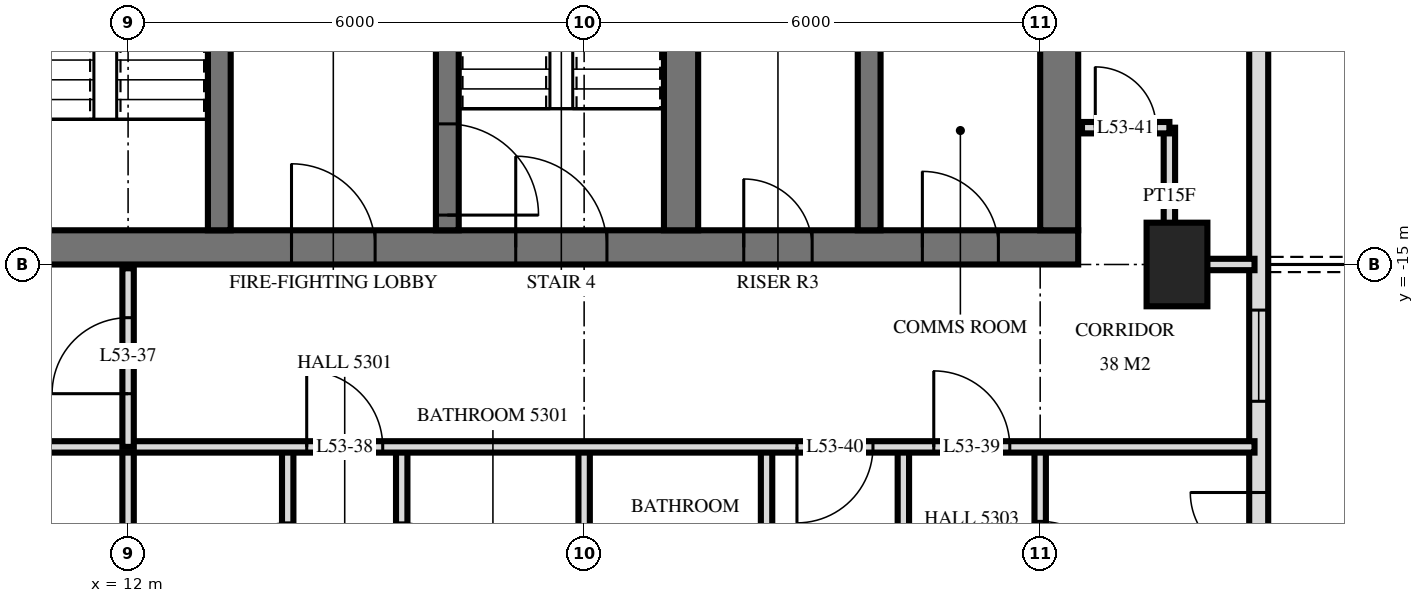
"""IFC4 building model, lengths in metres.
Left out: names, types, materials, properties, quantities, classifications, styles, units other than length and angle.
Written with IfcOpenShell. Run it as: python <this file> out.ifc"""

import sys

from ifc_helpers import new_model, si_unit, direction, frame, frame_2d, origin, origin_2d, place, context, subcontext, project, spatial, rectangle, extrude, element, fill, save


model = new_model("IFC4")
c1 = context("Model", 3, precision=1e-05, world=origin(), true_north=direction((0.0, 1.0)))
c2 = subcontext(c1, "Body", "Model", "MODEL_VIEW")
j1 = project(units=[si_unit("LENGTHUNIT", "METRE"), si_unit("PLANEANGLEUNIT", "RADIAN")], contexts=[c1])
p1 = place(None, origin())
s1 = spatial("IfcSite", under=j1, at=p1, CompositionType="ELEMENT")
p2 = place(p1, origin())
s2 = spatial("IfcBuilding", under=s1, at=p2, CompositionType="ELEMENT")
p3 = place(p2, frame((0.0, 0.0, 204.6)))
s3 = spatial("IfcBuildingStorey", under=s2, at=p3, CompositionType="ELEMENT", Elevation=204.6)
p4 = place(p3, frame((25.8, -15.0, 0.0), z_axis=(0.0, 0.0, 1.0), x_axis=(0.0, 1.0, 0.0)))
e1 = element("IfcColumn", 1, at=p4, inside=s3, PredefinedType="COLUMN", context=c2, shape_type="SweptSolid", body=[
    extrude(rectangle(XDim=1.1, YDim=0.8, at=origin_2d()), origin(), (0.0, 0.0, 1.0), 3.5),
])
p5 = place(p3, frame((10.0, -14.775, 0.0), z_axis=(0.0, 0.0, 1.0), x_axis=(1.0, 0.0, 0.0)))
e2 = element("IfcWall", 2, at=p5, inside=s3, PredefinedType="SHEAR", context=c2, shape_type="SweptSolid", body=[
    extrude(rectangle(XDim=14.5, YDim=0.45, at=frame_2d((7.25, 0.0))), origin(), (0.0, 0.0, 1.0), 3.5),
])
p6 = place(p5, frame((7.1, 0.0, 0.0)))
e3 = element("IfcOpeningElement", 3, at=p6, cuts=e2, PredefinedType="OPENING", context=c2, shape_type="SweptSolid", body=[
    extrude(rectangle(XDim=1.2, YDim=2.1, at=frame_2d((0.6, 1.05))), frame((0.0, 0.235, 0.0), z_axis=(0.0, -1.0, 0.0), x_axis=(1.0, 0.0, 0.0)), (0.0, 0.0, 1.0), 0.47),
])
p7 = place(p5, frame((4.15, 0.0, 0.0)))
e4 = element("IfcOpeningElement", 4, at=p7, cuts=e2, PredefinedType="OPENING", context=c2, shape_type="SweptSolid", body=[
    extrude(rectangle(XDim=1.1, YDim=2.1, at=frame_2d((0.55, 1.05))), frame((0.0, 0.235, 0.0), z_axis=(0.0, -1.0, 0.0), x_axis=(1.0, 0.0, 0.0)), (0.0, 0.0, 1.0), 0.47),
])
p8 = place(p5, frame((10.1, 0.0, 0.0)))
e5 = element("IfcOpeningElement", 5, at=p8, cuts=e2, PredefinedType="OPENING", context=c2, shape_type="SweptSolid", body=[
    extrude(rectangle(XDim=0.9, YDim=2.1, at=frame_2d((0.45, 1.05))), frame((0.0, 0.235, 0.0), z_axis=(0.0, -1.0, 0.0), x_axis=(1.0, 0.0, 0.0)), (0.0, 0.0, 1.0), 0.47),
])
p9 = place(p5, frame((12.45, 0.0, 0.0)))
e6 = element("IfcOpeningElement", 6, at=p9, cuts=e2, PredefinedType="OPENING", context=c2, shape_type="SweptSolid", body=[
    extrude(rectangle(XDim=1.0, YDim=2.1, at=frame_2d((0.5, 1.05))), frame((0.0, 0.235, 0.0), z_axis=(0.0, -1.0, 0.0), x_axis=(1.0, 0.0, 0.0)), (0.0, 0.0, 1.0), 0.47),
])
p10 = place(p3, frame((24.25, -14.55, 0.0), z_axis=(0.0, 0.0, 1.0), x_axis=(0.0, 1.0, 0.0)))
e7 = element("IfcWall", 7, at=p10, inside=s3, PredefinedType="SHEAR", context=c2, shape_type="SweptSolid", body=[
    extrude(rectangle(XDim=14.1, YDim=0.5, at=frame_2d((7.05, 0.0))), origin(), (0.0, 0.0, 1.0), 3.5),
])
p11 = place(p3, frame((13.2, -14.55, 0.0), z_axis=(0.0, 0.0, 1.0), x_axis=(0.0, 1.0, 0.0)))
e8 = element("IfcWall", 8, at=p11, inside=s3, PredefinedType="SHEAR", context=c2, shape_type="SweptSolid", body=[
    extrude(rectangle(XDim=5.4, YDim=0.3, at=frame_2d((2.7, 0.0))), origin(), (0.0, 0.0, 1.0), 3.5),
])
p12 = place(p11, frame((4.0, 0.0, 0.0)))
e9 = element("IfcOpeningElement", 9, at=p12, cuts=e8, PredefinedType="OPENING", context=c2, shape_type="SweptSolid", body=[
    extrude(rectangle(XDim=1.2, YDim=2.1, at=frame_2d((0.6, 1.05))), frame((0.0, 0.16, 0.0), z_axis=(0.0, -1.0, 0.0), x_axis=(1.0, 0.0, 0.0)), (0.0, 0.0, 1.0), 0.32),
])
p13 = place(p3, frame((16.2, -14.55, 0.0), z_axis=(0.0, 0.0, 1.0), x_axis=(0.0, 1.0, 0.0)))
e10 = element("IfcWall", 10, at=p13, inside=s3, PredefinedType="SHEAR", context=c2, shape_type="SweptSolid", body=[
    extrude(rectangle(XDim=5.4, YDim=0.3, at=frame_2d((2.7, 0.0))), origin(), (0.0, 0.0, 1.0), 3.5),
])
p14 = place(p13, frame((0.2, 0.0, 0.0)))
e11 = element("IfcOpeningElement", 11, at=p14, cuts=e10, PredefinedType="OPENING", context=c2, shape_type="SweptSolid", body=[
    extrude(rectangle(XDim=1.2, YDim=2.1, at=frame_2d((0.6, 1.05))), frame((0.0, 0.16, 0.0), z_axis=(0.0, -1.0, 0.0), x_axis=(1.0, 0.0, 0.0)), (0.0, 0.0, 1.0), 0.32),
])
p15 = place(p3, frame((19.275, -14.55, 0.0), z_axis=(0.0, 0.0, 1.0), x_axis=(0.0, 1.0, 0.0)))
e12 = element("IfcWall", 12, at=p15, inside=s3, PredefinedType="SHEAR", context=c2, shape_type="SweptSolid", body=[
    extrude(rectangle(XDim=5.4, YDim=0.45, at=frame_2d((2.7, 0.0))), origin(), (0.0, 0.0, 1.0), 3.5),
])
p16 = place(p3, frame((21.75, -14.55, 0.0), z_axis=(0.0, 0.0, 1.0), x_axis=(0.0, 1.0, 0.0)))
e13 = element("IfcWall", 13, at=p16, inside=s3, PredefinedType="SHEAR", context=c2, shape_type="SweptSolid", body=[
    extrude(rectangle(XDim=5.4, YDim=0.3, at=frame_2d((2.7, 0.0))), origin(), (0.0, 0.0, 1.0), 3.5),
])
p17 = place(p3, frame((26.875, -24.875, 0.0), z_axis=(0.0, 0.0, 1.0), x_axis=(0.0, 1.0, 0.0)))
e14 = element("IfcWall", 14, at=p17, inside=s3, PredefinedType="SOLIDWALL", context=c2, shape_type="SweptSolid", body=[
    extrude(rectangle(XDim=21.551, YDim=0.25, at=frame_2d((10.775, 0.0))), origin(), (0.0, 0.0, 1.0), 3.22),
])
p18 = place(p17, frame((0.575, 0.0, 0.0)))
e15 = element("IfcOpeningElement", 15, at=p18, cuts=e14, PredefinedType="OPENING", context=c2, shape_type="SweptSolid", body=[
    extrude(rectangle(XDim=1.8, YDim=2.4, at=frame_2d((0.9, 1.2))), frame((0.0, 0.135, 0.0), z_axis=(0.0, -1.0, 0.0), x_axis=(1.0, 0.0, 0.0)), (0.0, 0.0, 1.0), 0.27),
])
p19 = place(p17, frame((5.075, 0.0, 0.0)))
e16 = element("IfcOpeningElement", 16, at=p19, cuts=e14, PredefinedType="OPENING", context=c2, shape_type="SweptSolid", body=[
    extrude(rectangle(XDim=1.8, YDim=2.4, at=frame_2d((0.9, 1.2))), frame((0.0, 0.135, 0.0), z_axis=(0.0, -1.0, 0.0), x_axis=(1.0, 0.0, 0.0)), (0.0, 0.0, 1.0), 0.27),
])
p20 = place(p17, frame((8.075, 0.0, 0.9)))
e17 = element("IfcOpeningElement", 17, at=p20, cuts=e14, PredefinedType="OPENING", context=c2, shape_type="SweptSolid", body=[
    extrude(rectangle(XDim=1.2, YDim=1.5, at=frame_2d((0.6, 0.75))), frame((0.0, 0.135, 0.0), z_axis=(0.0, -1.0, 0.0), x_axis=(1.0, 0.0, 0.0)), (0.0, 0.0, 1.0), 0.27),
])
p21 = place(p17, frame((13.1, 0.0, 0.0)))
e18 = element("IfcOpeningElement", 18, at=p21, cuts=e14, PredefinedType="OPENING", context=c2, shape_type="SweptSolid", body=[
    extrude(rectangle(XDim=1.8, YDim=2.4, at=frame_2d((0.9, 1.2))), frame((0.0, 0.135, 0.0), z_axis=(0.0, -1.0, 0.0), x_axis=(1.0, 0.0, 0.0)), (0.0, 0.0, 1.0), 0.27),
])
p22 = place(p3, frame((25.7, -15.0, 0.0), z_axis=(0.0, 0.0, 1.0), x_axis=(0.0, 1.0, 0.0)))
e19 = element("IfcWall", 19, at=p22, inside=s3, PredefinedType="PARTITIONING", context=c2, shape_type="SweptSolid", body=[
    extrude(rectangle(XDim=1.8, YDim=0.15, at=frame_2d((0.9, 0.0))), origin(), (0.0, 0.0, 1.0), 3.22),
])
p23 = place(p3, frame((24.0, -20.4, 0.0), z_axis=(0.0, 0.0, 1.0), x_axis=(0.0, 1.0, 0.0)))
e20 = element("IfcWall", 20, at=p23, inside=s3, PredefinedType="PARTITIONING", context=c2, shape_type="SweptSolid", body=[
    extrude(rectangle(XDim=3.0, YDim=0.15, at=frame_2d((1.5, 0.0))), origin(), (0.0, 0.0, 1.0), 3.22),
])
p24 = place(p23, frame((1.02, 0.0, 0.0)))
e21 = element("IfcOpeningElement", 21, at=p24, cuts=e20, PredefinedType="OPENING", context=c2, shape_type="SweptSolid", body=[
    extrude(rectangle(XDim=1.0, YDim=2.1, at=frame_2d((0.5, 1.05))), frame((0.0, 0.085, 0.0), z_axis=(0.0, -1.0, 0.0), x_axis=(1.0, 0.0, 0.0)), (0.0, 0.0, 1.0), 0.17),
])
for number, where, z_axis, x_axis in (
    (22, (22.2, -20.4, 0.0), (0.0, 0.0, 1.0), (0.0, 1.0, 0.0)),
    (23, (20.4, -20.4, 0.0), (0.0, 0.0, 1.0), (0.0, 1.0, 0.0)),
):
    element("IfcWall", number, at=place(p3, frame(where, z_axis=z_axis, x_axis=x_axis)), inside=s3, PredefinedType="PARTITIONING", context=c2, shape_type="SweptSolid", body=[
        extrude(rectangle(XDim=3.0, YDim=0.15, at=frame_2d((1.5, 0.0))), origin(), (0.0, 0.0, 1.0), 3.22),
    ])
p25 = place(p3, frame((18.0, -29.22, 0.0), z_axis=(0.0, 0.0, 1.0), x_axis=(0.0, 1.0, 0.0)))
e24 = element("IfcWall", 24, at=p25, inside=s3, PredefinedType="PARTITIONING", context=c2, shape_type="SweptSolid", body=[
    extrude(rectangle(XDim=11.82, YDim=0.15, at=frame_2d((5.91, 0.0))), origin(), (0.0, 0.0, 1.0), 3.22),
])
p26 = place(p3, frame((15.6, -20.4, 0.0), z_axis=(0.0, 0.0, 1.0), x_axis=(0.0, 1.0, 0.0)))
e25 = element("IfcWall", 25, at=p26, inside=s3, PredefinedType="PARTITIONING", context=c2, shape_type="SweptSolid", body=[
    extrude(rectangle(XDim=3.0, YDim=0.15, at=frame_2d((1.5, 0.0))), origin(), (0.0, 0.0, 1.0), 3.22),
])
p27 = place(p26, frame((1.0, 0.0, 0.0)))
e26 = element("IfcOpeningElement", 26, at=p27, cuts=e25, PredefinedType="OPENING", context=c2, shape_type="SweptSolid", body=[
    extrude(rectangle(XDim=1.0, YDim=2.1, at=frame_2d((0.5, 1.05))), frame((0.0, 0.085, 0.0), z_axis=(0.0, -1.0, 0.0), x_axis=(1.0, 0.0, 0.0)), (0.0, 0.0, 1.0), 0.17),
])
p28 = place(p3, frame((14.1, -20.4, 0.0), z_axis=(0.0, 0.0, 1.0), x_axis=(0.0, 1.0, 0.0)))
e27 = element("IfcWall", 27, at=p28, inside=s3, PredefinedType="PARTITIONING", context=c2, shape_type="SweptSolid", body=[
    extrude(rectangle(XDim=3.0, YDim=0.15, at=frame_2d((1.5, 0.0))), origin(), (0.0, 0.0, 1.0), 3.22),
])
p29 = place(p28, frame((1.0, 0.0, 0.0)))
e28 = element("IfcOpeningElement", 28, at=p29, cuts=e27, PredefinedType="OPENING", context=c2, shape_type="SweptSolid", body=[
    extrude(rectangle(XDim=1.0, YDim=2.1, at=frame_2d((0.5, 1.05))), frame((0.0, 0.085, 0.0), z_axis=(0.0, -1.0, 0.0), x_axis=(1.0, 0.0, 0.0)), (0.0, 0.0, 1.0), 0.17),
])
p30 = place(p3, frame((12.0, -17.4, 0.0), z_axis=(0.0, 0.0, 1.0), x_axis=(0.0, 1.0, 0.0)))
e29 = element("IfcWall", 29, at=p30, inside=s3, PredefinedType="PARTITIONING", context=c2, shape_type="SweptSolid", body=[
    extrude(rectangle(XDim=2.35, YDim=0.15, at=frame_2d((1.175, 0.0))), origin(), (0.0, 0.0, 1.0), 3.22),
])
p31 = place(p30, frame((0.7, 0.0, 0.0)))
e30 = element("IfcOpeningElement", 30, at=p31, cuts=e29, PredefinedType="OPENING", context=c2, shape_type="SweptSolid", body=[
    extrude(rectangle(XDim=1.0, YDim=2.1, at=frame_2d((0.5, 1.05))), frame((0.0, 0.085, 0.0), z_axis=(0.0, -1.0, 0.0), x_axis=(1.0, 0.0, 0.0)), (0.0, 0.0, 1.0), 0.17),
])
p32 = place(p3, frame((12.0, -29.22, 0.0), z_axis=(0.0, 0.0, 1.0), x_axis=(0.0, 1.0, 0.0)))
e31 = element("IfcWall", 31, at=p32, inside=s3, PredefinedType="PARTITIONING", context=c2, shape_type="SweptSolid", body=[
    extrude(rectangle(XDim=11.82, YDim=0.15, at=frame_2d((5.91, 0.0))), origin(), (0.0, 0.0, 1.0), 3.22),
])
p33 = place(p3, frame((-26.82, -17.4, 0.0), z_axis=(0.0, 0.0, 1.0), x_axis=(1.0, 0.0, 0.0)))
e32 = element("IfcWall", 32, at=p33, inside=s3, PredefinedType="PARTITIONING", context=c2, shape_type="SweptSolid", body=[
    extrude(rectangle(XDim=53.64, YDim=0.15, at=frame_2d((26.82, 0.0))), origin(), (0.0, 0.0, 1.0), 3.22),
])
p34 = place(p33, frame((4.92, 0.0, 0.0)))
e33 = element("IfcOpeningElement", 33, at=p34, cuts=e32, PredefinedType="OPENING", context=c2, shape_type="SweptSolid", body=[
    extrude(rectangle(XDim=1.0, YDim=2.1, at=frame_2d((0.5, 1.05))), frame((0.0, 0.085, 0.0), z_axis=(0.0, -1.0, 0.0), x_axis=(1.0, 0.0, 0.0)), (0.0, 0.0, 1.0), 0.17),
])
p35 = place(p33, frame((1.62, 0.0, 0.0)))
e34 = element("IfcOpeningElement", 34, at=p35, cuts=e32, PredefinedType="OPENING", context=c2, shape_type="SweptSolid", body=[
    extrude(rectangle(XDim=1.0, YDim=2.1, at=frame_2d((0.5, 1.05))), frame((0.0, 0.085, 0.0), z_axis=(0.0, -1.0, 0.0), x_axis=(1.0, 0.0, 0.0)), (0.0, 0.0, 1.0), 0.17),
])
p36 = place(p33, frame((41.17, 0.0, 0.0)))
e35 = element("IfcOpeningElement", 35, at=p36, cuts=e32, PredefinedType="OPENING", context=c2, shape_type="SweptSolid", body=[
    extrude(rectangle(XDim=1.0, YDim=2.1, at=frame_2d((0.5, 1.05))), frame((0.0, 0.085, 0.0), z_axis=(0.0, -1.0, 0.0), x_axis=(1.0, 0.0, 0.0)), (0.0, 0.0, 1.0), 0.17),
])
p37 = place(p33, frame((49.42, 0.0, 0.0)))
e36 = element("IfcOpeningElement", 36, at=p37, cuts=e32, PredefinedType="OPENING", context=c2, shape_type="SweptSolid", body=[
    extrude(rectangle(XDim=1.0, YDim=2.1, at=frame_2d((0.5, 1.05))), frame((0.0, 0.085, 0.0), z_axis=(0.0, -1.0, 0.0), x_axis=(1.0, 0.0, 0.0)), (0.0, 0.0, 1.0), 0.17),
])
p38 = place(p33, frame((47.62, 0.0, 0.0)))
e37 = element("IfcOpeningElement", 37, at=p38, cuts=e32, PredefinedType="OPENING", context=c2, shape_type="SweptSolid", body=[
    extrude(rectangle(XDim=1.0, YDim=2.1, at=frame_2d((0.5, 1.05))), frame((0.0, 0.085, 0.0), z_axis=(0.0, -1.0, 0.0), x_axis=(1.0, 0.0, 0.0)), (0.0, 0.0, 1.0), 0.17),
])
p39 = place(p33, frame((21.82, 0.0, 0.0)))
e38 = element("IfcOpeningElement", 38, at=p39, cuts=e32, PredefinedType="OPENING", context=c2, shape_type="SweptSolid", body=[
    extrude(rectangle(XDim=1.0, YDim=2.1, at=frame_2d((0.5, 1.05))), frame((0.0, 0.085, 0.0), z_axis=(0.0, -1.0, 0.0), x_axis=(1.0, 0.0, 0.0)), (0.0, 0.0, 1.0), 0.17),
])
p40 = place(p33, frame((33.82, 0.0, 0.0)))
e39 = element("IfcOpeningElement", 39, at=p40, cuts=e32, PredefinedType="OPENING", context=c2, shape_type="SweptSolid", body=[
    extrude(rectangle(XDim=1.0, YDim=2.1, at=frame_2d((0.5, 1.05))), frame((0.0, 0.085, 0.0), z_axis=(0.0, -1.0, 0.0), x_axis=(1.0, 0.0, 0.0)), (0.0, 0.0, 1.0), 0.17),
])
p41 = place(p3, frame((25.7, -15.0, 0.0), z_axis=(0.0, 0.0, 1.0), x_axis=(1.0, 0.0, 0.0)))
e40 = element("IfcWall", 40, at=p41, inside=s3, PredefinedType="PARTITIONING", context=c2, shape_type="SweptSolid", body=[
    extrude(rectangle(XDim=1.12, YDim=0.15, at=frame_2d((0.56, 0.0))), origin(), (0.0, 0.0, 1.0), 3.22),
])
p42 = place(p3, frame((24.55, -13.2, 0.0), z_axis=(0.0, 0.0, 1.0), x_axis=(1.0, 0.0, 0.0)))
e41 = element("IfcWall", 41, at=p42, inside=s3, PredefinedType="PARTITIONING", context=c2, shape_type="SweptSolid", body=[
    extrude(rectangle(XDim=1.15, YDim=0.15, at=frame_2d((0.575, 0.0))), origin(), (0.0, 0.0, 1.0), 3.22),
])
p43 = place(p42, frame((0.175, 0.0, 0.0)))
e42 = element("IfcOpeningElement", 42, at=p43, cuts=e41, PredefinedType="OPENING", context=c2, shape_type="SweptSolid", body=[
    extrude(rectangle(XDim=0.8, YDim=2.1, at=frame_2d((0.4, 1.05))), frame((0.0, 0.085, 0.0), z_axis=(0.0, -1.0, 0.0), x_axis=(1.0, 0.0, 0.0)), (0.0, 0.0, 1.0), 0.17),
])
p44 = place(p19, origin())
e43 = element("IfcDoor", 43, at=p44, inside=s3, OperationType="DOUBLE_DOOR_SINGLE_SWING", PredefinedType="DOOR", context=c2, shape_type="SweptSolid", body=[
    extrude(rectangle(XDim=1.8, YDim=2.4, at=frame_2d((0.9, 1.2))), frame((0.0, 0.025, 0.0), z_axis=(0.0, -1.0, 0.0), x_axis=(1.0, 0.0, 0.0)), (0.0, 0.0, 1.0), 0.05),
])
fill(e16, e43)
p45 = place(p20, origin())
e44 = element("IfcWindow", 44, at=p45, inside=s3, PartitioningType="SINGLE_PANEL", PredefinedType="WINDOW", context=c2, shape_type="SweptSolid", body=[
    extrude(rectangle(XDim=1.2, YDim=1.5, at=frame_2d((0.6, 0.75))), frame((0.0, 0.03, 0.0), z_axis=(0.0, -1.0, 0.0), x_axis=(1.0, 0.0, 0.0)), (0.0, 0.0, 1.0), 0.06),
])
fill(e17, e44)
p46 = place(p6, origin())
e45 = element("IfcDoor", 45, at=p46, inside=s3, OperationType="SINGLE_SWING_RIGHT", PredefinedType="DOOR", context=c2, shape_type="SweptSolid", body=[
    extrude(rectangle(XDim=1.2, YDim=2.1, at=frame_2d((0.6, 1.05))), frame((0.0, 0.025, 0.0), z_axis=(0.0, -1.0, 0.0), x_axis=(1.0, 0.0, 0.0)), (0.0, 0.0, 1.0), 0.05),
])
fill(e3, e45)
p47 = place(p7, origin())
e46 = element("IfcDoor", 46, at=p47, inside=s3, OperationType="SINGLE_SWING_RIGHT", PredefinedType="DOOR", context=c2, shape_type="SweptSolid", body=[
    extrude(rectangle(XDim=1.1, YDim=2.1, at=frame_2d((0.55, 1.05))), frame((0.0, 0.025, 0.0), z_axis=(0.0, -1.0, 0.0), x_axis=(1.0, 0.0, 0.0)), (0.0, 0.0, 1.0), 0.05),
])
fill(e4, e46)
p48 = place(p8, origin())
e47 = element("IfcDoor", 47, at=p48, inside=s3, OperationType="SINGLE_SWING_RIGHT", PredefinedType="DOOR", context=c2, shape_type="SweptSolid", body=[
    extrude(rectangle(XDim=0.9, YDim=2.1, at=frame_2d((0.45, 1.05))), frame((0.0, 0.025, 0.0), z_axis=(0.0, -1.0, 0.0), x_axis=(1.0, 0.0, 0.0)), (0.0, 0.0, 1.0), 0.05),
])
fill(e5, e47)
p49 = place(p9, origin())
e48 = element("IfcDoor", 48, at=p49, inside=s3, OperationType="SINGLE_SWING_RIGHT", PredefinedType="DOOR", context=c2, shape_type="SweptSolid", body=[
    extrude(rectangle(XDim=1.0, YDim=2.1, at=frame_2d((0.5, 1.05))), frame((0.0, 0.025, 0.0), z_axis=(0.0, -1.0, 0.0), x_axis=(1.0, 0.0, 0.0)), (0.0, 0.0, 1.0), 0.05),
])
fill(e6, e48)
p50 = place(p14, frame((0.6, 0.0, 0.0), z_axis=(0.0, 0.0, 1.0), x_axis=(-1.0, 0.0, 0.0)))
e49 = element("IfcDoor", 49, at=p50, inside=s3, OperationType="SINGLE_SWING_LEFT", PredefinedType="DOOR", context=c2, shape_type="SweptSolid", body=[
    extrude(rectangle(XDim=1.2, YDim=2.1, at=frame_2d((0.0, 1.05))), frame((0.0, -0.025, 0.0), z_axis=(0.0, 1.0, 0.0), x_axis=(-1.0, 0.0, 0.0)), (0.0, 0.0, 1.0), 0.05),
])
fill(e11, e49)
p51 = place(p31, origin())
e50 = element("IfcDoor", 50, at=p51, inside=s3, OperationType="SINGLE_SWING_RIGHT", PredefinedType="DOOR", context=c2, shape_type="SweptSolid", body=[
    extrude(rectangle(XDim=1.0, YDim=2.1, at=frame_2d((0.5, 1.05))), frame((0.0, 0.025, 0.0), z_axis=(0.0, -1.0, 0.0), x_axis=(1.0, 0.0, 0.0)), (0.0, 0.0, 1.0), 0.05),
])
fill(e30, e50)
p52 = place(p36, origin())
e51 = element("IfcDoor", 51, at=p52, inside=s3, OperationType="SINGLE_SWING_RIGHT", PredefinedType="DOOR", context=c2, shape_type="SweptSolid", body=[
    extrude(rectangle(XDim=1.0, YDim=2.1, at=frame_2d((0.5, 1.05))), frame((0.0, 0.025, 0.0), z_axis=(0.0, -1.0, 0.0), x_axis=(1.0, 0.0, 0.0)), (0.0, 0.0, 1.0), 0.05),
])
fill(e35, e51)
p53 = place(p37, origin())
e52 = element("IfcDoor", 52, at=p53, inside=s3, OperationType="SINGLE_SWING_RIGHT", PredefinedType="DOOR", context=c2, shape_type="SweptSolid", body=[
    extrude(rectangle(XDim=1.0, YDim=2.1, at=frame_2d((0.5, 1.05))), frame((0.0, 0.025, 0.0), z_axis=(0.0, -1.0, 0.0), x_axis=(1.0, 0.0, 0.0)), (0.0, 0.0, 1.0), 0.05),
])
fill(e36, e52)
p54 = place(p38, frame((0.5, 0.0, 0.0), z_axis=(0.0, 0.0, 1.0), x_axis=(-1.0, 0.0, 0.0)))
e53 = element("IfcDoor", 53, at=p54, inside=s3, OperationType="SINGLE_SWING_LEFT", PredefinedType="DOOR", context=c2, shape_type="SweptSolid", body=[
    extrude(rectangle(XDim=1.0, YDim=2.1, at=frame_2d((0.0, 1.05))), frame((0.0, -0.025, 0.0), z_axis=(0.0, 1.0, 0.0), x_axis=(-1.0, 0.0, 0.0)), (0.0, 0.0, 1.0), 0.05),
])
fill(e37, e53)
p55 = place(p43, origin())
e54 = element("IfcDoor", 54, at=p55, inside=s3, OperationType="SINGLE_SWING_RIGHT", PredefinedType="DOOR", context=c2, shape_type="SweptSolid", body=[
    extrude(rectangle(XDim=0.8, YDim=2.1, at=frame_2d((0.4, 1.05))), frame((0.0, 0.025, 0.0), z_axis=(0.0, -1.0, 0.0), x_axis=(1.0, 0.0, 0.0)), (0.0, 0.0, 1.0), 0.05),
])
fill(e42, e54)
p56 = place(p24, frame((0.5, 0.0, 0.0), z_axis=(0.0, 0.0, 1.0), x_axis=(-1.0, 0.0, 0.0)))
e55 = element("IfcDoor", 55, at=p56, inside=s3, OperationType="SINGLE_SWING_LEFT", PredefinedType="DOOR", context=c2, shape_type="SweptSolid", body=[
    extrude(rectangle(XDim=1.0, YDim=2.1, at=frame_2d((0.0, 1.05))), frame((0.0, -0.025, 0.0), z_axis=(0.0, 1.0, 0.0), x_axis=(-1.0, 0.0, 0.0)), (0.0, 0.0, 1.0), 0.05),
])
fill(e21, e55)
save(model, sys.argv[1])
